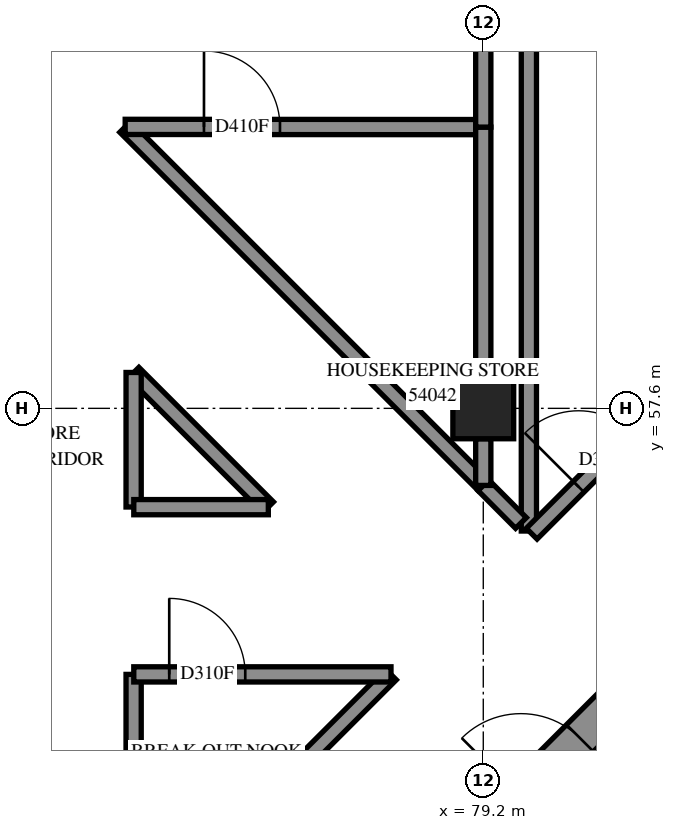
"""IFC4 building model, lengths in metres.
Left out: names, types, materials, properties, quantities, classifications, styles, units other than length and angle.
Written with IfcOpenShell. Run it as: python <this file> out.ifc"""

import sys

from ifc_helpers import new_model, si_unit, direction, frame, frame_2d, origin, origin_2d, place, context, subcontext, project, spatial, rectangle, extrude, element, fill, save


model = new_model("IFC4")
c1 = context("Model", 3, precision=1e-05, world=origin(), true_north=direction((0.0, 1.0)))
c2 = subcontext(c1, "Body", "Model", "MODEL_VIEW")
j1 = project(units=[si_unit("LENGTHUNIT", "METRE"), si_unit("PLANEANGLEUNIT", "RADIAN")], contexts=[c1])
p1 = place(None, origin())
s1 = spatial("IfcSite", under=j1, at=p1, CompositionType="ELEMENT")
p2 = place(p1, origin())
s2 = spatial("IfcBuilding", under=s1, at=p2, CompositionType="ELEMENT")
p3 = place(p2, frame((0.0, 0.0, 199.8)))
s3 = spatial("IfcBuildingStorey", under=s2, at=p3, CompositionType="ELEMENT", Elevation=199.8)
p4 = place(p3, frame((79.2, 57.6, 0.0), z_axis=(0.0, 0.0, 1.0), x_axis=(1.0, 0.0, 0.0)))
e1 = element("IfcColumn", 1, at=p4, inside=s3, PredefinedType="COLUMN", context=c2, shape_type="SweptSolid", body=[
    extrude(rectangle(XDim=0.8, YDim=0.8, at=origin_2d()), origin(), (0.0, 0.0, 1.0), 3.1),
])
p5 = place(p3, frame((76.478, 49.267, -0.3), z_axis=(0.0, 0.0, 1.0), x_axis=(0.7071067812, 0.7071067812, 0.0)))
e2 = element("IfcWall", 2, at=p5, inside=s3, PredefinedType="SHEAR", context=c2, shape_type="SweptSolid", body=[
    extrude(rectangle(XDim=14.4, YDim=0.5, at=frame_2d((7.2, 0.0))), origin(), (0.0, 0.0, 1.0), 2.7),
])
p6 = place(p5, frame((4.55, 0.0, 0.3)))
e3 = element("IfcOpeningElement", 3, at=p6, cuts=e2, PredefinedType="OPENING", context=c2, shape_type="SweptSolid", body=[
    extrude(rectangle(XDim=1.1, YDim=2.1, at=frame_2d((0.55, 1.05))), frame((0.0, 0.26, 0.0), z_axis=(0.0, -1.0, 0.0), x_axis=(1.0, 0.0, 0.0)), (0.0, 0.0, 1.0), 0.52),
])
p7 = place(p5, frame((11.35, 0.0, 0.3)))
e4 = element("IfcOpeningElement", 4, at=p7, cuts=e2, PredefinedType="OPENING", context=c2, shape_type="SweptSolid", body=[
    extrude(rectangle(XDim=1.1, YDim=2.1, at=frame_2d((0.55, 1.05))), frame((0.0, 0.26, 0.0), z_axis=(0.0, -1.0, 0.0), x_axis=(1.0, 0.0, 0.0)), (0.0, 0.0, 1.0), 0.52),
])
p8 = place(p3, frame((79.8, 55.986, 0.0), z_axis=(0.0, 0.0, 1.0), x_axis=(0.0, 1.0, 0.0)))
e5 = element("IfcWall", 5, at=p8, inside=s3, PredefinedType="PARTITIONING", context=c2, shape_type="SweptSolid", body=[
    extrude(rectangle(XDim=11.522, YDim=0.2, at=frame_2d((5.761, 0.0))), origin(), (0.0, 0.0, 1.0), 3.1),
])
p9 = place(p3, frame((79.837, 55.951, 0.0), z_axis=(0.0, 0.0, 1.0), x_axis=(0.7071067812, 0.7071067812, 0.0)))
e6 = element("IfcWall", 6, at=p9, inside=s3, PredefinedType="PARTITIONING", context=c2, shape_type="SweptSolid", body=[
    extrude(rectangle(XDim=9.897, YDim=0.2, at=frame_2d((4.948, 0.0))), origin(), (0.0, 0.0, 1.0), 3.1),
])
p10 = place(p9, frame((0.873, 0.0, 0.0)))
e7 = element("IfcOpeningElement", 7, at=p10, cuts=e6, PredefinedType="OPENING", context=c2, shape_type="SweptSolid", body=[
    extrude(rectangle(XDim=1.0, YDim=2.1, at=frame_2d((0.5, 1.05))), frame((0.0, 0.11, 0.0), z_axis=(0.0, -1.0, 0.0), x_axis=(1.0, 0.0, 0.0)), (0.0, 0.0, 1.0), 0.22),
])
p11 = place(p3, frame((74.489, 61.303, 0.0), z_axis=(0.0, 0.0, 1.0), x_axis=(0.7071892763, -0.7070242765, 0.0)))
e8 = element("IfcWall", 8, at=p11, inside=s3, PredefinedType="PARTITIONING", context=c2, shape_type="SweptSolid", body=[
    extrude(rectangle(XDim=6.667, YDim=0.2, at=frame_2d((3.333, 0.0))), origin(), (0.0, 0.0, 1.0), 3.1),
])
p12 = place(p3, frame((74.601, 50.715, 0.0), z_axis=(0.0, 0.0, 1.0), x_axis=(0.7071067812, 0.7071067812, 0.0)))
e9 = element("IfcWall", 9, at=p12, inside=s3, PredefinedType="PARTITIONING", context=c2, shape_type="SweptSolid", body=[
    extrude(rectangle(XDim=4.786, YDim=0.2, at=frame_2d((2.393, 0.0))), origin(), (0.0, 0.0, 1.0), 3.1),
])
p13 = place(p3, frame((74.489, 61.303, 0.0), z_axis=(0.0, 0.0, 1.0), x_axis=(0.9999998105, -0.0006155543, 0.0)))
e10 = element("IfcWall", 10, at=p13, inside=s3, PredefinedType="PARTITIONING", context=c2, shape_type="SweptSolid", body=[
    extrude(rectangle(XDim=4.711, YDim=0.2, at=frame_2d((2.356, 0.0))), origin(), (0.0, 0.0, 1.0), 3.1),
])
p14 = place(p13, frame((1.037, 0.0, 0.0)))
e11 = element("IfcOpeningElement", 11, at=p14, cuts=e10, PredefinedType="OPENING", context=c2, shape_type="SweptSolid", body=[
    extrude(rectangle(XDim=1.0, YDim=2.1, at=frame_2d((0.5, 1.05))), frame((0.0, 0.11, 0.0), z_axis=(0.0, -1.0, 0.0), x_axis=(1.0, 0.0, 0.0)), (0.0, 0.0, 1.0), 0.22),
])
p15 = place(p3, frame((74.6, 50.714, 0.0), z_axis=(0.0, 0.0, 1.0), x_axis=(0.0, 1.0, 0.0)))
e12 = element("IfcWall", 12, at=p15, inside=s3, PredefinedType="PARTITIONING", context=c2, shape_type="SweptSolid", body=[
    extrude(rectangle(XDim=3.386, YDim=0.2, at=frame_2d((1.693, 0.0))), origin(), (0.0, 0.0, 1.0), 3.1),
])
p16 = place(p3, frame((74.602, 54.1, 0.0), z_axis=(0.0, 0.0, 1.0), x_axis=(1.0, 0.0, 0.0)))
e13 = element("IfcWall", 13, at=p16, inside=s3, PredefinedType="PARTITIONING", context=c2, shape_type="SweptSolid", body=[
    extrude(rectangle(XDim=3.384, YDim=0.2, at=frame_2d((1.692, 0.0))), origin(), (0.0, 0.0, 1.0), 3.1),
])
p17 = place(p16, frame((0.467, 0.0, 0.0)))
e14 = element("IfcOpeningElement", 14, at=p17, cuts=e13, PredefinedType="OPENING", context=c2, shape_type="SweptSolid", body=[
    extrude(rectangle(XDim=1.0, YDim=2.1, at=frame_2d((0.5, 1.05))), frame((0.0, 0.11, 0.0), z_axis=(0.0, -1.0, 0.0), x_axis=(1.0, 0.0, 0.0)), (0.0, 0.0, 1.0), 0.22),
])
p18 = place(p3, frame((79.2, 58.0, 0.0), z_axis=(0.0, 0.0, 1.0), x_axis=(0.0, 1.0, 0.0)))
e15 = element("IfcWall", 15, at=p18, inside=s3, PredefinedType="PARTITIONING", context=c2, shape_type="SweptSolid", body=[
    extrude(rectangle(XDim=3.3, YDim=0.2, at=frame_2d((1.65, 0.0))), origin(), (0.0, 0.0, 1.0), 3.1),
])
p19 = place(p3, frame((74.599, 58.069, 0.0), z_axis=(0.0, 0.0, 1.0), x_axis=(0.7071067812, -0.7071067812, 0.0)))
e16 = element("IfcWall", 16, at=p19, inside=s3, PredefinedType="PARTITIONING", context=c2, shape_type="SweptSolid", body=[
    extrude(rectangle(XDim=2.503, YDim=0.2, at=frame_2d((1.252, 0.0))), origin(), (0.0, 0.0, 1.0), 3.1),
])
p20 = place(p3, frame((79.2, 61.3, 0.0), z_axis=(0.0, 0.0, 1.0), x_axis=(0.0, 1.0, 0.0)))
e17 = element("IfcWall", 17, at=p20, inside=s3, PredefinedType="PARTITIONING", context=c2, shape_type="SweptSolid", body=[
    extrude(rectangle(XDim=2.2, YDim=0.2, at=frame_2d((1.1, 0.0))), origin(), (0.0, 0.0, 1.0), 3.1),
])
for number, where, z_axis, x_axis in (
    (18, (74.6, 56.302, 0.0), (0.0, 0.0, 1.0), (0.0, 1.0, 0.0)),
    (19, (74.602, 56.3, 0.0), (0.0, 0.0, 1.0), (1.0, 0.0, 0.0)),
):
    element("IfcWall", number, at=place(p3, frame(where, z_axis=z_axis, x_axis=x_axis)), inside=s3, PredefinedType="PARTITIONING", context=c2, shape_type="SweptSolid", body=[
        extrude(rectangle(XDim=1.77, YDim=0.2, at=frame_2d((0.885, 0.0))), origin(), (0.0, 0.0, 1.0), 3.1),
    ])
p21 = place(p3, frame((79.202, 56.588, 0.0), z_axis=(0.0, 0.0, 1.0), x_axis=(0.7056768426, -0.7085338339, 0.0)))
e20 = element("IfcWall", 20, at=p21, inside=s3, PredefinedType="PARTITIONING", context=c2, shape_type="SweptSolid", body=[
    extrude(rectangle(XDim=0.7, YDim=0.2, at=frame_2d((0.35, 0.0))), origin(), (0.0, 0.0, 1.0), 3.1),
])
p22 = place(p3, frame((79.2, 56.586, 0.0), z_axis=(0.0, 0.0, 1.0), x_axis=(0.0, 1.0, 0.0)))
e21 = element("IfcWall", 21, at=p22, inside=s3, PredefinedType="PARTITIONING", context=c2, shape_type="SweptSolid", body=[
    extrude(rectangle(XDim=0.614, YDim=0.2, at=frame_2d((0.307, 0.0))), origin(), (0.0, 0.0, 1.0), 3.1),
])
p23 = place(p6, origin())
e22 = element("IfcDoor", 22, at=p23, inside=s3, OperationType="DOUBLE_DOOR_SINGLE_SWING", PredefinedType="DOOR", context=c2, shape_type="SweptSolid", body=[
    extrude(rectangle(XDim=1.1, YDim=2.1, at=frame_2d((0.55, 1.05))), frame((0.0, 0.025, 0.0), z_axis=(0.0, -1.0, 0.0), x_axis=(1.0, 0.0, 0.0)), (0.0, 0.0, 1.0), 0.05),
])
fill(e3, e22)
p24 = place(p17, origin())
e23 = element("IfcDoor", 23, at=p24, inside=s3, OperationType="SINGLE_SWING_RIGHT", PredefinedType="DOOR", context=c2, shape_type="SweptSolid", body=[
    extrude(rectangle(XDim=1.0, YDim=2.1, at=frame_2d((0.5, 1.05))), frame((0.0, 0.025, 0.0), z_axis=(0.0, -1.0, 0.0), x_axis=(1.0, 0.0, 0.0)), (0.0, 0.0, 1.0), 0.05),
])
fill(e14, e23)
p25 = place(p14, origin())
e24 = element("IfcDoor", 24, at=p25, inside=s3, OperationType="SINGLE_SWING_RIGHT", PredefinedType="DOOR", context=c2, shape_type="SweptSolid", body=[
    extrude(rectangle(XDim=1.0, YDim=2.1, at=frame_2d((0.5, 1.05))), frame((0.0, 0.025, 0.0), z_axis=(0.0, -1.0, 0.0), x_axis=(1.0, 0.0, 0.0)), (0.0, 0.0, 1.0), 0.05),
])
fill(e11, e24)
p26 = place(p10, origin())
e25 = element("IfcDoor", 25, at=p26, inside=s3, OperationType="SINGLE_SWING_RIGHT", PredefinedType="DOOR", context=c2, shape_type="SweptSolid", body=[
    extrude(rectangle(XDim=1.0, YDim=2.1, at=frame_2d((0.5, 1.05))), frame((0.0, 0.025, 0.0), z_axis=(0.0, -1.0, 0.0), x_axis=(1.0, 0.0, 0.0)), (0.0, 0.0, 1.0), 0.05),
])
fill(e7, e25)
save(model, sys.argv[1])
